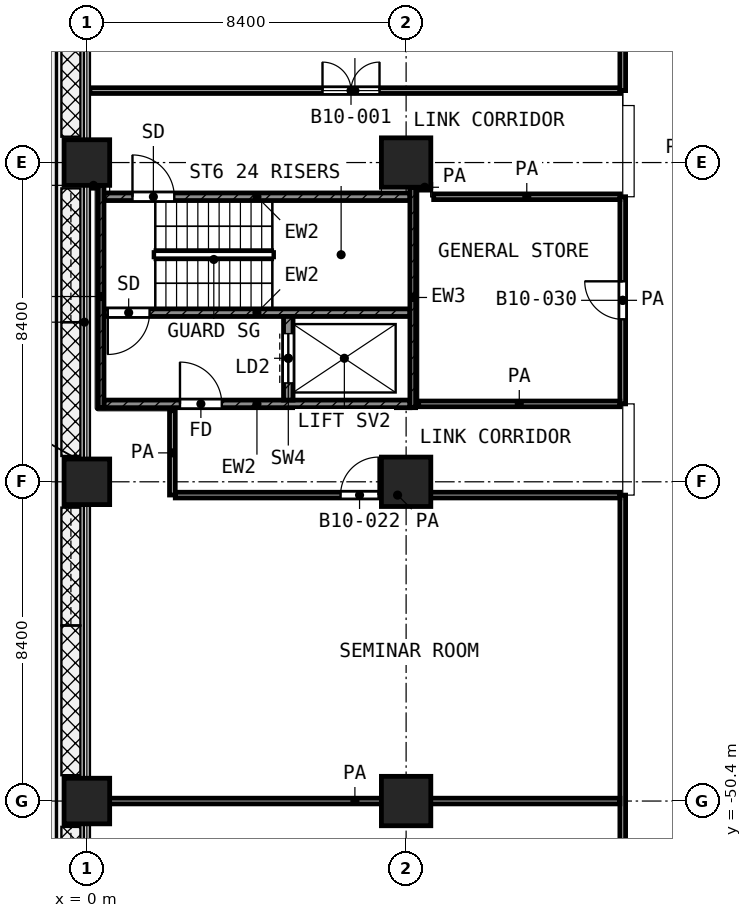
"""IFC4 building model, lengths in metres.
Left out: names, types, materials, properties, quantities, classifications, styles, units other than length and angle.
Written with IfcOpenShell. Run it as: python <this file> out.ifc"""

import sys

from ifc_helpers import new_model, si_unit, direction, frame, frame_2d, origin, origin_2d, place, context, subcontext, project, spatial, rectangle, extrude, element, fill, save


model = new_model("IFC4")
c1 = context("Model", 3, precision=1e-05, world=origin(), true_north=direction((0.0, 1.0)))
c2 = subcontext(c1, "Body", "Model", "MODEL_VIEW")
j1 = project(units=[si_unit("LENGTHUNIT", "METRE"), si_unit("PLANEANGLEUNIT", "RADIAN")], contexts=[c1])
p1 = place(None, origin())
s1 = spatial("IfcSite", under=j1, at=p1, CompositionType="ELEMENT")
p2 = place(p1, origin())
s2 = spatial("IfcBuilding", under=s1, at=p2, CompositionType="ELEMENT")
p3 = place(p2, frame((0.0, 0.0, 47.6)))
s3 = spatial("IfcBuildingStorey", under=s2, at=p3, CompositionType="ELEMENT", Elevation=47.6)
p4 = place(p3, frame((0.0, -33.6, 0.0), z_axis=(0.0, 0.0, 1.0), x_axis=(1.0, 0.0, 0.0)))
e1 = element("IfcColumn", 1, at=p4, inside=s3, PredefinedType="COLUMN", context=c2, shape_type="SweptSolid", body=[
    extrude(rectangle(XDim=1.2, YDim=1.2, at=origin_2d()), origin(), (0.0, 0.0, 1.0), 4.2),
])
p5 = place(p3, frame((8.4, -33.6, 0.0), z_axis=(0.0, 0.0, 1.0), x_axis=(1.0, 0.0, 0.0)))
e2 = element("IfcColumn", 2, at=p5, inside=s3, PredefinedType="COLUMN", context=c2, shape_type="SweptSolid", body=[
    extrude(rectangle(XDim=1.3, YDim=1.3, at=origin_2d()), origin(), (0.0, 0.0, 1.0), 4.2),
])
p6 = place(p3, frame((0.0, -42.0, 0.0), z_axis=(0.0, 0.0, 1.0), x_axis=(1.0, 0.0, 0.0)))
e3 = element("IfcColumn", 3, at=p6, inside=s3, PredefinedType="COLUMN", context=c2, shape_type="SweptSolid", body=[
    extrude(rectangle(XDim=1.2, YDim=1.2, at=origin_2d()), origin(), (0.0, 0.0, 1.0), 4.2),
])
p7 = place(p3, frame((8.4, -42.0, 0.0), z_axis=(0.0, 0.0, 1.0), x_axis=(1.0, 0.0, 0.0)))
e4 = element("IfcColumn", 4, at=p7, inside=s3, PredefinedType="COLUMN", context=c2, shape_type="SweptSolid", body=[
    extrude(rectangle(XDim=1.3, YDim=1.3, at=origin_2d()), origin(), (0.0, 0.0, 1.0), 4.2),
])
p8 = place(p3, frame((0.0, -50.4, 0.0), z_axis=(0.0, 0.0, 1.0), x_axis=(1.0, 0.0, 0.0)))
e5 = element("IfcColumn", 5, at=p8, inside=s3, PredefinedType="COLUMN", context=c2, shape_type="SweptSolid", body=[
    extrude(rectangle(XDim=1.2, YDim=1.2, at=origin_2d()), origin(), (0.0, 0.0, 1.0), 4.2),
])
p9 = place(p3, frame((8.4, -50.4, 0.0), z_axis=(0.0, 0.0, 1.0), x_axis=(1.0, 0.0, 0.0)))
e6 = element("IfcColumn", 6, at=p9, inside=s3, PredefinedType="COLUMN", context=c2, shape_type="SweptSolid", body=[
    extrude(rectangle(XDim=1.3, YDim=1.3, at=origin_2d()), origin(), (0.0, 0.0, 1.0), 4.2),
])
p10 = place(p3, frame((0.375, -40.05, 0.0), z_axis=(0.0, 0.0, 1.0), x_axis=(0.0, 1.0, 0.0)))
e7 = element("IfcWall", 7, at=p10, inside=s3, PredefinedType="SHEAR", context=c2, shape_type="SweptSolid", body=[
    extrude(rectangle(XDim=5.85, YDim=0.15, at=frame_2d((2.925, 0.0))), origin(), (0.0, 0.0, 1.0), 3.78),
])
p11 = place(p3, frame((8.575, -40.05, 0.0), z_axis=(0.0, 0.0, 1.0), x_axis=(0.0, 1.0, 0.0)))
e8 = element("IfcWall", 8, at=p11, inside=s3, PredefinedType="SHEAR", context=c2, shape_type="SweptSolid", body=[
    extrude(rectangle(XDim=5.8, YDim=0.15, at=frame_2d((2.9, 0.0))), origin(), (0.0, 0.0, 1.0), 3.78),
])
p12 = place(p3, frame((0.45, -34.5, 0.0), z_axis=(0.0, 0.0, 1.0), x_axis=(1.0, 0.0, 0.0)))
e9 = element("IfcWall", 9, at=p12, inside=s3, PredefinedType="SHEAR", context=c2, shape_type="SweptSolid", body=[
    extrude(rectangle(XDim=8.05, YDim=0.2, at=frame_2d((4.025, 0.0))), origin(), (0.0, 0.0, 1.0), 3.78),
])
p13 = place(p12, frame((0.75, 0.0, 0.0)))
e10 = element("IfcOpeningElement", 10, at=p13, cuts=e9, PredefinedType="OPENING", context=c2, shape_type="SweptSolid", body=[
    extrude(rectangle(XDim=1.1, YDim=2.1, at=frame_2d((0.55, 1.05))), frame((0.0, 0.11, 0.0), z_axis=(0.0, -1.0, 0.0), x_axis=(1.0, 0.0, 0.0)), (0.0, 0.0, 1.0), 0.22),
])
p14 = place(p3, frame((0.45, -37.55, 0.0), z_axis=(0.0, 0.0, 1.0), x_axis=(1.0, 0.0, 0.0)))
e11 = element("IfcWall", 11, at=p14, inside=s3, PredefinedType="SHEAR", context=c2, shape_type="SweptSolid", body=[
    extrude(rectangle(XDim=8.05, YDim=0.2, at=frame_2d((4.025, 0.0))), origin(), (0.0, 0.0, 1.0), 3.78),
])
p15 = place(p14, frame((0.1, 0.0, 0.0)))
e12 = element("IfcOpeningElement", 12, at=p15, cuts=e11, PredefinedType="OPENING", context=c2, shape_type="SweptSolid", body=[
    extrude(rectangle(XDim=1.1, YDim=2.1, at=frame_2d((0.55, 1.05))), frame((0.0, 0.11, 0.0), z_axis=(0.0, -1.0, 0.0), x_axis=(1.0, 0.0, 0.0)), (0.0, 0.0, 1.0), 0.22),
])
p16 = place(p3, frame((0.45, -39.95, 0.0), z_axis=(0.0, 0.0, 1.0), x_axis=(1.0, 0.0, 0.0)))
e13 = element("IfcWall", 13, at=p16, inside=s3, PredefinedType="SHEAR", context=c2, shape_type="SweptSolid", body=[
    extrude(rectangle(XDim=8.05, YDim=0.2, at=frame_2d((4.025, 0.0))), origin(), (0.0, 0.0, 1.0), 3.78),
])
p17 = place(p16, frame((2.0, 0.0, 0.0)))
e14 = element("IfcOpeningElement", 14, at=p17, cuts=e13, PredefinedType="OPENING", context=c2, shape_type="SweptSolid", body=[
    extrude(rectangle(XDim=1.1, YDim=2.1, at=frame_2d((0.55, 1.05))), frame((0.0, 0.11, 0.0), z_axis=(0.0, -1.0, 0.0), x_axis=(1.0, 0.0, 0.0)), (0.0, 0.0, 1.0), 0.22),
])
p18 = place(p3, frame((5.3, -39.85, 0.0), z_axis=(0.0, 0.0, 1.0), x_axis=(0.0, 1.0, 0.0)))
e15 = element("IfcWall", 15, at=p18, inside=s3, PredefinedType="SHEAR", context=c2, shape_type="SweptSolid", body=[
    extrude(rectangle(XDim=2.2, YDim=0.25, at=frame_2d((1.1, 0.0))), origin(), (0.0, 0.0, 1.0), 3.78),
])
p19 = place(p18, frame((0.45, 0.0, 0.0)))
e16 = element("IfcOpeningElement", 16, at=p19, cuts=e15, PredefinedType="OPENING", context=c2, shape_type="SweptSolid", body=[
    extrude(rectangle(XDim=1.3, YDim=2.1, at=frame_2d((0.65, 1.05))), frame((0.0, 0.135, 0.0), z_axis=(0.0, -1.0, 0.0), x_axis=(1.0, 0.0, 0.0)), (0.0, 0.0, 1.0), 0.27),
])
p20 = place(p3, frame((0.08, -50.4, 0.0), z_axis=(0.0, 0.0, 1.0), x_axis=(1.0, 0.0, 0.0)))
e17 = element("IfcWall", 17, at=p20, inside=s3, PredefinedType="PARTITIONING", context=c2, shape_type="SweptSolid", body=[
    extrude(rectangle(XDim=13.945, YDim=0.15, at=frame_2d((6.972, 0.0))), origin(), (0.0, 0.0, 1.0), 3.78),
])
p21 = place(p3, frame((2.326, -42.35, 0.0), z_axis=(0.0, 0.0, 1.0), x_axis=(1.0, 0.0, 0.0)))
e18 = element("IfcWall", 18, at=p21, inside=s3, PredefinedType="PARTITIONING", context=c2, shape_type="SweptSolid", body=[
    extrude(rectangle(XDim=11.699, YDim=0.15, at=frame_2d((5.85, 0.0))), origin(), (0.0, 0.0, 1.0), 3.78),
])
p22 = place(p21, frame((4.349, 0.0, 0.0)))
e19 = element("IfcOpeningElement", 19, at=p22, cuts=e18, PredefinedType="OPENING", context=c2, shape_type="SweptSolid", body=[
    extrude(rectangle(XDim=1.0, YDim=2.1, at=frame_2d((0.5, 1.05))), frame((0.0, 0.085, 0.0), z_axis=(0.0, -1.0, 0.0), x_axis=(1.0, 0.0, 0.0)), (0.0, 0.0, 1.0), 0.17),
])
p23 = place(p3, frame((8.73, -39.95, 0.0), z_axis=(0.0, 0.0, 1.0), x_axis=(1.0, 0.0, 0.0)))
e20 = element("IfcWall", 20, at=p23, inside=s3, PredefinedType="PARTITIONING", context=c2, shape_type="SweptSolid", body=[
    extrude(rectangle(XDim=5.295, YDim=0.15, at=frame_2d((2.647, 0.0))), origin(), (0.0, 0.0, 1.0), 3.78),
])
p24 = place(p3, frame((9.125, -34.5, 0.0), z_axis=(0.0, 0.0, 1.0), x_axis=(1.0, 0.0, 0.0)))
e21 = element("IfcWall", 21, at=p24, inside=s3, PredefinedType="PARTITIONING", context=c2, shape_type="SweptSolid", body=[
    extrude(rectangle(XDim=4.9, YDim=0.15, at=frame_2d((2.45, 0.0))), origin(), (0.0, 0.0, 1.0), 3.78),
])
p25 = place(p3, frame((8.73, -34.25, 0.0), z_axis=(0.0, 0.0, 1.0), x_axis=(1.0, 0.0, 0.0)))
e22 = element("IfcWall", 22, at=p25, inside=s3, PredefinedType="PARTITIONING", context=c2, shape_type="SweptSolid", body=[
    extrude(rectangle(XDim=0.319, YDim=0.15, at=frame_2d((0.16, 0.0))), origin(), (0.0, 0.0, 1.0), 3.78),
])
p26 = place(p3, frame((0.08, -34.2, 0.0), z_axis=(0.0, 0.0, 1.0), x_axis=(1.0, 0.0, 0.0)))
e23 = element("IfcWall", 23, at=p26, inside=s3, PredefinedType="PARTITIONING", context=c2, shape_type="SweptSolid", body=[
    extrude(rectangle(XDim=0.19, YDim=0.15, at=frame_2d((0.095, 0.0))), origin(), (0.0, 0.0, 1.0), 3.78),
])
p27 = place(p3, frame((0.08, -31.707, 0.0), z_axis=(0.0, 0.0, 1.0), x_axis=(1.0, 0.0, 0.0)))
e24 = element("IfcWall", 24, at=p27, inside=s3, PredefinedType="PARTITIONING", context=c2, shape_type="SweptSolid", body=[
    extrude(rectangle(XDim=13.945, YDim=0.15, at=frame_2d((6.972, 0.0))), origin(), (0.0, 0.0, 1.0), 3.78),
])
p28 = place(p27, frame((6.12, 0.0, 0.0)))
e25 = element("IfcOpeningElement", 25, at=p28, cuts=e24, PredefinedType="OPENING", context=c2, shape_type="SweptSolid", body=[
    extrude(rectangle(XDim=1.5, YDim=2.1, at=frame_2d((0.75, 1.05))), frame((0.0, 0.085, 0.0), z_axis=(0.0, -1.0, 0.0), x_axis=(1.0, 0.0, 0.0)), (0.0, 0.0, 1.0), 0.17),
])
p29 = place(p3, frame((2.25, -42.348, 0.0), z_axis=(0.0, 0.0, 1.0), x_axis=(0.0, 1.0, 0.0)))
e26 = element("IfcWall", 26, at=p29, inside=s3, PredefinedType="PARTITIONING", context=c2, shape_type="SweptSolid", body=[
    extrude(rectangle(XDim=2.218, YDim=0.15, at=frame_2d((1.109, 0.0))), origin(), (0.0, 0.0, 1.0), 3.78),
])
p30 = place(p3, frame((14.1, -75.52, 0.0), z_axis=(0.0, 0.0, 1.0), x_axis=(0.0, 1.0, 0.0)))
e27 = element("IfcWall", 27, at=p30, inside=s3, PredefinedType="PARTITIONING", context=c2, shape_type="SweptSolid", body=[
    extrude(rectangle(XDim=33.17, YDim=0.15, at=frame_2d((16.585, 0.0))), origin(), (0.0, 0.0, 1.0), 3.78),
])
p31 = place(p30, frame((20.42, 0.0, 0.0)))
e28 = element("IfcOpeningElement", 28, at=p31, cuts=e27, PredefinedType="OPENING", context=c2, shape_type="SweptSolid", body=[
    extrude(rectangle(XDim=1.0, YDim=2.1, at=frame_2d((0.5, 1.05))), frame((0.0, 0.085, 0.0), z_axis=(0.0, -1.0, 0.0), x_axis=(1.0, 0.0, 0.0)), (0.0, 0.0, 1.0), 0.17),
])
p32 = place(p30, frame((12.02, 0.0, 0.0)))
e29 = element("IfcOpeningElement", 29, at=p32, cuts=e27, PredefinedType="OPENING", context=c2, shape_type="SweptSolid", body=[
    extrude(rectangle(XDim=1.0, YDim=2.1, at=frame_2d((0.5, 1.05))), frame((0.0, 0.085, 0.0), z_axis=(0.0, -1.0, 0.0), x_axis=(1.0, 0.0, 0.0)), (0.0, 0.0, 1.0), 0.17),
])
p33 = place(p30, frame((3.62, 0.0, 0.0)))
e30 = element("IfcOpeningElement", 30, at=p33, cuts=e27, PredefinedType="OPENING", context=c2, shape_type="SweptSolid", body=[
    extrude(rectangle(XDim=1.0, YDim=2.1, at=frame_2d((0.5, 1.05))), frame((0.0, 0.085, 0.0), z_axis=(0.0, -1.0, 0.0), x_axis=(1.0, 0.0, 0.0)), (0.0, 0.0, 1.0), 0.17),
])
p34 = place(p3, frame((14.1, -39.95, 0.0), z_axis=(0.0, 0.0, 1.0), x_axis=(0.0, 1.0, 0.0)))
e31 = element("IfcWall", 31, at=p34, inside=s3, PredefinedType="PARTITIONING", context=c2, shape_type="SweptSolid", body=[
    extrude(rectangle(XDim=5.45, YDim=0.15, at=frame_2d((2.725, 0.0))), origin(), (0.0, 0.0, 1.0), 3.78),
])
p35 = place(p34, frame((2.225, 0.0, 0.0)))
e32 = element("IfcOpeningElement", 32, at=p35, cuts=e31, PredefinedType="OPENING", context=c2, shape_type="SweptSolid", body=[
    extrude(rectangle(XDim=1.0, YDim=2.1, at=frame_2d((0.5, 1.05))), frame((0.0, 0.085, 0.0), z_axis=(0.0, -1.0, 0.0), x_axis=(1.0, 0.0, 0.0)), (0.0, 0.0, 1.0), 0.17),
])
p36 = place(p3, frame((14.1, -31.707, 0.0), z_axis=(0.0, 0.0, 1.0), x_axis=(0.0, 1.0, 0.0)))
e33 = element("IfcWall", 33, at=p36, inside=s3, PredefinedType="PARTITIONING", context=c2, shape_type="SweptSolid", body=[
    extrude(rectangle(XDim=2.307, YDim=0.15, at=frame_2d((1.154, 0.0))), origin(), (0.0, 0.0, 1.0), 3.78),
])
p37 = place(p13, origin())
e34 = element("IfcDoor", 34, at=p37, inside=s3, OperationType="SINGLE_SWING_LEFT", PredefinedType="DOOR", context=c2, shape_type="SweptSolid", body=[
    extrude(rectangle(XDim=1.1, YDim=2.1, at=frame_2d((0.55, 1.05))), frame((0.0, 0.025, 0.0), z_axis=(0.0, -1.0, 0.0), x_axis=(1.0, 0.0, 0.0)), (0.0, 0.0, 1.0), 0.05),
])
fill(e10, e34)
p38 = place(p15, frame((1.1, 0.0, 0.0), z_axis=(0.0, 0.0, 1.0), x_axis=(-1.0, 0.0, 0.0)))
e35 = element("IfcDoor", 35, at=p38, inside=s3, OperationType="SINGLE_SWING_LEFT", PredefinedType="DOOR", context=c2, shape_type="SweptSolid", body=[
    extrude(rectangle(XDim=1.1, YDim=2.1, at=frame_2d((0.55, 1.05))), frame((0.0, 0.025, 0.0), z_axis=(0.0, -1.0, 0.0), x_axis=(1.0, 0.0, 0.0)), (0.0, 0.0, 1.0), 0.05),
])
fill(e12, e35)
p39 = place(p19, origin())
e36 = element("IfcDoor", 36, at=p39, inside=s3, OperationType="DOUBLE_DOOR_SLIDING", PredefinedType="DOOR", context=c2, shape_type="SweptSolid", body=[
    extrude(rectangle(XDim=1.3, YDim=2.1, at=frame_2d((0.65, 1.05))), frame((0.0, 0.025, 0.0), z_axis=(0.0, -1.0, 0.0), x_axis=(1.0, 0.0, 0.0)), (0.0, 0.0, 1.0), 0.05),
])
fill(e16, e36)
p40 = place(p17, origin())
e37 = element("IfcDoor", 37, at=p40, inside=s3, OperationType="SINGLE_SWING_LEFT", PredefinedType="DOOR", context=c2, shape_type="SweptSolid", body=[
    extrude(rectangle(XDim=1.1, YDim=2.1, at=frame_2d((0.55, 1.05))), frame((0.0, 0.025, 0.0), z_axis=(0.0, -1.0, 0.0), x_axis=(1.0, 0.0, 0.0)), (0.0, 0.0, 1.0), 0.05),
])
fill(e14, e37)
p41 = place(p28, origin())
e38 = element("IfcDoor", 38, at=p41, inside=s3, OperationType="DOUBLE_DOOR_SINGLE_SWING", PredefinedType="DOOR", context=c2, shape_type="SweptSolid", body=[
    extrude(rectangle(XDim=1.5, YDim=2.1, at=frame_2d((0.75, 1.05))), frame((0.0, 0.025, 0.0), z_axis=(0.0, -1.0, 0.0), x_axis=(1.0, 0.0, 0.0)), (0.0, 0.0, 1.0), 0.05),
])
fill(e25, e38)
p42 = place(p22, origin())
e39 = element("IfcDoor", 39, at=p42, inside=s3, OperationType="SINGLE_SWING_RIGHT", PredefinedType="DOOR", context=c2, shape_type="SweptSolid", body=[
    extrude(rectangle(XDim=1.0, YDim=2.1, at=frame_2d((0.5, 1.05))), frame((0.0, 0.025, 0.0), z_axis=(0.0, -1.0, 0.0), x_axis=(1.0, 0.0, 0.0)), (0.0, 0.0, 1.0), 0.05),
])
fill(e19, e39)
p43 = place(p35, origin())
e40 = element("IfcDoor", 40, at=p43, inside=s3, OperationType="SINGLE_SWING_RIGHT", PredefinedType="DOOR", context=c2, shape_type="SweptSolid", body=[
    extrude(rectangle(XDim=1.0, YDim=2.1, at=frame_2d((0.5, 1.05))), frame((0.0, 0.025, 0.0), z_axis=(0.0, -1.0, 0.0), x_axis=(1.0, 0.0, 0.0)), (0.0, 0.0, 1.0), 0.05),
])
fill(e32, e40)
save(model, sys.argv[1])
